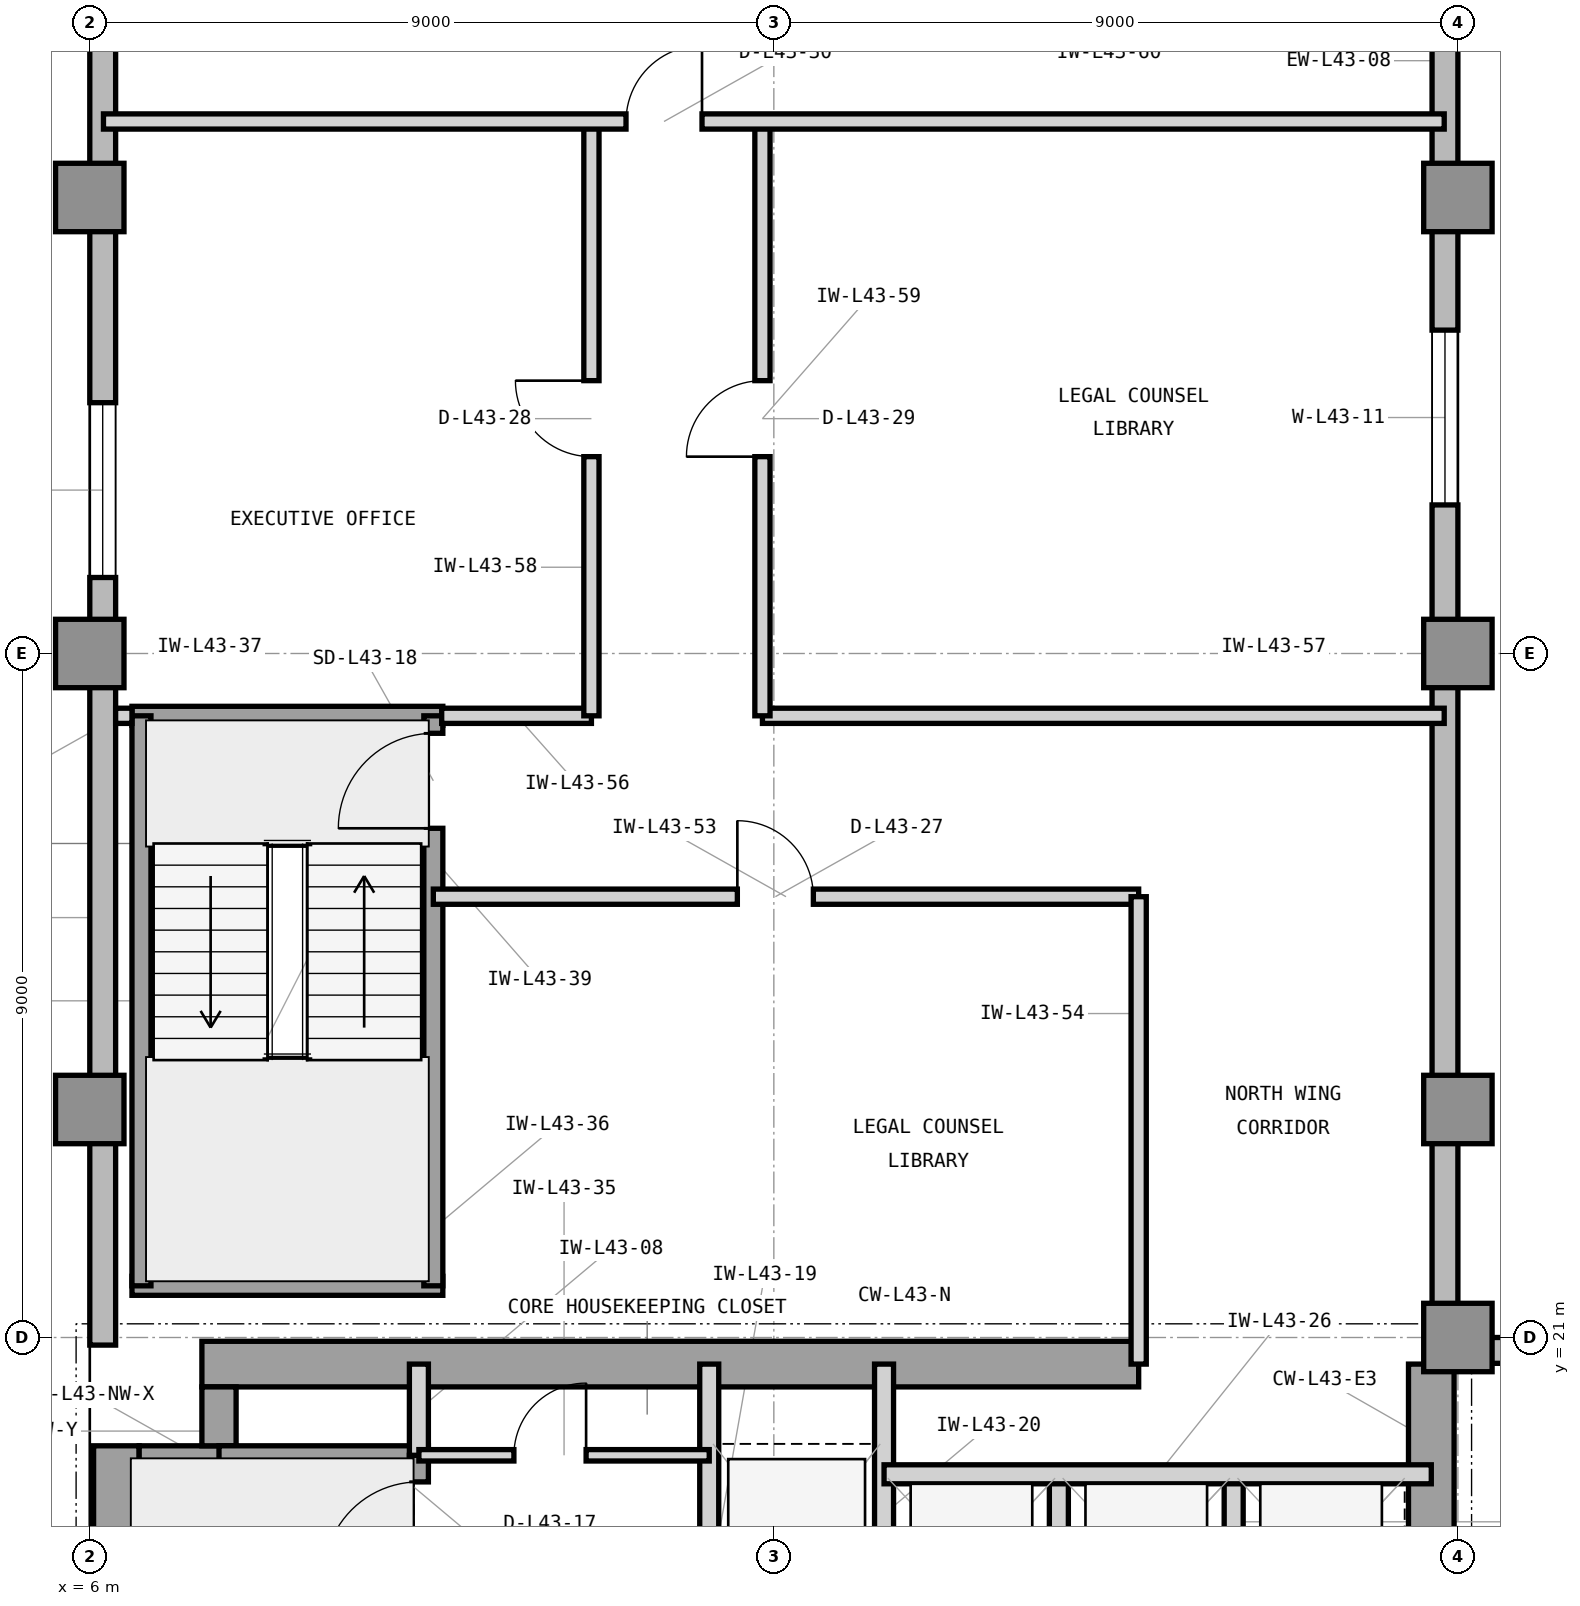
"""IFC4 building model, lengths in metres.
Left out: names, types, materials, properties, quantities, classifications, styles, units other than length and angle.
Written with IfcOpenShell. Run it as: python <this file> out.ifc"""

import sys

from ifc_helpers import new_model, si_unit, direction, frame, frame_2d, origin, origin_2d, place, context, subcontext, project, spatial, rectangle, extrude, element, fill, save


model = new_model("IFC4")
c1 = context("Model", 3, precision=1e-05, world=origin(), true_north=direction((0.0, 1.0)))
c2 = subcontext(c1, "Body", "Model", "MODEL_VIEW")
j1 = project(units=[si_unit("LENGTHUNIT", "METRE"), si_unit("PLANEANGLEUNIT", "RADIAN")], contexts=[c1])
p1 = place(None, origin())
s1 = spatial("IfcSite", under=j1, at=p1, CompositionType="ELEMENT")
p2 = place(p1, origin())
s2 = spatial("IfcBuilding", under=s1, at=p2, CompositionType="ELEMENT")
p3 = place(p2, frame((0.0, 0.0, 180.0)))
s3 = spatial("IfcBuildingStorey", under=s2, at=p3, CompositionType="ELEMENT", Elevation=180.0)
p4 = place(p3, frame((6.35, 4.425, 0.0), z_axis=(0.0, 0.0, 1.0), x_axis=(0.0, 1.0, 0.0)))
e1 = element("IfcWall", 1, at=p4, inside=s3, PredefinedType="SHEAR", context=c2, shape_type="SweptSolid", body=[
    extrude(rectangle(XDim=15.15, YDim=0.6, at=frame_2d((7.575, 0.0))), origin(), (0.0, 0.0, 1.0), 3.9),
])
p5 = place(p3, frame((7.475, 20.65, 0.0), z_axis=(0.0, 0.0, 1.0), x_axis=(1.0, 0.0, 0.0)))
e2 = element("IfcWall", 2, at=p5, inside=s3, PredefinedType="SHEAR", context=c2, shape_type="SweptSolid", body=[
    extrude(rectangle(XDim=12.325, YDim=0.6, at=frame_2d((6.163, 0.0))), origin(), (0.0, 0.0, 1.0), 3.9),
])
p6 = place(p3, frame((23.65, 16.6, 0.0), z_axis=(0.0, 0.0, 1.0), x_axis=(0.0, 1.0, 0.0)))
e3 = element("IfcWall", 3, at=p6, inside=s3, PredefinedType="SHEAR", context=c2, shape_type="SweptSolid", body=[
    extrude(rectangle(XDim=4.05, YDim=0.6, at=frame_2d((2.025, 0.0))), origin(), (0.0, 0.0, 1.0), 3.9),
])
p7 = place(p3, frame((6.65, 19.35, 0.0), z_axis=(0.0, 0.0, 1.0), x_axis=(1.0, 0.0, 0.0)))
e4 = element("IfcWall", 4, at=p7, inside=s3, PredefinedType="SHEAR", context=c2, shape_type="SweptSolid", body=[
    extrude(rectangle(XDim=1.275, YDim=0.45, at=frame_2d((0.638, 0.0))), origin(), (0.0, 0.0, 1.0), 3.9),
])
p8 = place(p3, frame((7.7, 19.575, 0.0), z_axis=(0.0, 0.0, 1.0), x_axis=(0.0, 1.0, 0.0)))
e5 = element("IfcWall", 5, at=p8, inside=s3, PredefinedType="SHEAR", context=c2, shape_type="SweptSolid", body=[
    extrude(rectangle(XDim=0.775, YDim=0.45, at=frame_2d((0.388, 0.0))), origin(), (0.0, 0.0, 1.0), 3.9),
])
for number, where, z_axis, x_axis in (
    (6, (24.0, 21.0, 0.0), (0.0, 0.0, 1.0), (1.0, 0.0, 0.0)),
    (7, (6.0, 24.0, 0.0), (0.0, 0.0, 1.0), (1.0, 0.0, 0.0)),
    (8, (24.0, 24.0, 0.0), (0.0, 0.0, 1.0), (1.0, 0.0, 0.0)),
    (9, (6.0, 30.0, 0.0), (0.0, 0.0, 1.0), (1.0, 0.0, 0.0)),
    (10, (24.0, 30.0, 0.0), (0.0, 0.0, 1.0), (1.0, 0.0, 0.0)),
    (11, (6.0, 36.0, 0.0), (0.0, 0.0, 1.0), (1.0, 0.0, 0.0)),
    (12, (24.0, 36.0, 0.0), (0.0, 0.0, 1.0), (1.0, 0.0, 0.0)),
):
    element("IfcColumn", number, at=place(p3, frame(where, z_axis=z_axis, x_axis=x_axis)), inside=s3, PredefinedType="COLUMN", context=c2, shape_type="SweptSolid", body=[
        extrude(rectangle(XDim=0.9, YDim=0.9, at=origin_2d()), origin(), (0.0, 0.0, 1.0), 3.9),
    ])
p9 = place(p3, frame((55.4, 20.83, 0.0), z_axis=(0.0, 0.0, 1.0), x_axis=(-1.0, 0.0, 0.0)))
e13 = element("IfcWall", 13, at=p9, inside=s3, PredefinedType="STANDARD", context=c2, shape_type="SweptSolid", body=[
    extrude(rectangle(XDim=31.4, YDim=0.34, at=frame_2d((15.7, 0.0))), origin(), (0.0, 0.0, 1.0), 3.7),
])
p10 = place(p9, frame((29.046, 0.0, 0.9)))
e14 = element("IfcOpeningElement", 14, at=p10, cuts=e13, PredefinedType="OPENING", context=c2, shape_type="SweptSolid", body=[
    extrude(rectangle(XDim=1.6, YDim=2.2, at=frame_2d((0.8, 1.1))), frame((0.0, 0.18, 0.0), z_axis=(0.0, -1.0, 0.0), x_axis=(1.0, 0.0, 0.0)), (0.0, 0.0, 1.0), 0.36),
])
p11 = place(p9, frame((10.125, 0.0, 0.9)))
e15 = element("IfcOpeningElement", 15, at=p11, cuts=e13, PredefinedType="OPENING", context=c2, shape_type="SweptSolid", body=[
    extrude(rectangle(XDim=2.3, YDim=2.2, at=frame_2d((1.15, 1.1))), frame((0.0, 0.18, 0.0), z_axis=(0.0, -1.0, 0.0), x_axis=(1.0, 0.0, 0.0)), (0.0, 0.0, 1.0), 0.36),
])
p12 = place(p3, frame((23.83, 21.0, 0.0), z_axis=(0.0, 0.0, 1.0), x_axis=(0.0, 1.0, 0.0)))
e16 = element("IfcWall", 16, at=p12, inside=s3, PredefinedType="STANDARD", context=c2, shape_type="SweptSolid", body=[
    extrude(rectangle(XDim=22.4, YDim=0.34, at=frame_2d((11.2, 0.0))), origin(), (0.0, 0.0, 1.0), 3.7),
])
p13 = place(p12, frame((10.955, 0.0, 0.9)))
e17 = element("IfcOpeningElement", 17, at=p13, cuts=e16, PredefinedType="OPENING", context=c2, shape_type="SweptSolid", body=[
    extrude(rectangle(XDim=2.3, YDim=2.2, at=frame_2d((1.15, 1.1))), frame((0.0, 0.18, 0.0), z_axis=(0.0, -1.0, 0.0), x_axis=(1.0, 0.0, 0.0)), (0.0, 0.0, 1.0), 0.36),
])
p14 = place(p3, frame((6.17, 43.4, 0.0), z_axis=(0.0, 0.0, 1.0), x_axis=(0.0, -1.0, 0.0)))
e18 = element("IfcWall", 18, at=p14, inside=s3, PredefinedType="STANDARD", context=c2, shape_type="SweptSolid", body=[
    extrude(rectangle(XDim=22.5, YDim=0.34, at=frame_2d((11.25, 0.0))), origin(), (0.0, 0.0, 1.0), 3.7),
])
p15 = place(p14, frame((10.1, 0.0, 0.9)))
e19 = element("IfcOpeningElement", 19, at=p15, cuts=e18, PredefinedType="OPENING", context=c2, shape_type="SweptSolid", body=[
    extrude(rectangle(XDim=2.3, YDim=2.2, at=frame_2d((1.15, 1.1))), frame((0.0, 0.18, 0.0), z_axis=(0.0, -1.0, 0.0), x_axis=(1.0, 0.0, 0.0)), (0.0, 0.0, 1.0), 0.36),
])
p16 = place(p3, frame((7.7, 19.45, 0.0), z_axis=(0.0, 0.0, 1.0), x_axis=(1.0, 0.0, 0.0)))
e20 = element("IfcWall", 20, at=p16, inside=s3, PredefinedType="SHEAR", context=c2, shape_type="SweptSolid", body=[
    extrude(rectangle(XDim=2.755, YDim=0.25, at=frame_2d((1.377, 0.0))), origin(), (0.0, 0.0, 1.0), 3.9),
])
p17 = place(p3, frame((10.33, 12.0, 0.0), z_axis=(0.0, 0.0, 1.0), x_axis=(0.0, 1.0, 0.0)))
e21 = element("IfcWall", 21, at=p17, inside=s3, PredefinedType="SHEAR", context=c2, shape_type="SweptSolid", body=[
    extrude(rectangle(XDim=7.45, YDim=0.25, at=frame_2d((3.725, 0.0))), origin(), (0.0, 0.0, 1.0), 3.9),
])
p18 = place(p17, frame((5.85, 0.0, 0.0)))
e22 = element("IfcOpeningElement", 22, at=p18, cuts=e21, PredefinedType="OPENING", context=c2, shape_type="SweptSolid", body=[
    extrude(rectangle(XDim=1.25, YDim=2.2, at=frame_2d((0.625, 1.1))), frame((0.0, 0.135, 0.0), z_axis=(0.0, -1.0, 0.0), x_axis=(1.0, 0.0, 0.0)), (0.0, 0.0, 1.0), 0.27),
])
p19 = place(p3, frame((10.33, 19.45, 0.0), z_axis=(0.0, 0.0, 1.0), x_axis=(0.0, 1.0, 0.0)))
e23 = element("IfcWall", 23, at=p19, inside=s3, PredefinedType="PARTITIONING", context=c2, shape_type="SweptSolid", body=[
    extrude(rectangle(XDim=1.2, YDim=0.25, at=frame_2d((0.6, 0.0))), origin(), (0.0, 0.0, 1.0), 3.073),
])
for number, where, z_axis, x_axis in (
    (24, (14.15, 16.7, 0.0), (0.0, 0.0, 1.0), (0.0, 1.0, 0.0)),
    (25, (16.45, 16.7, 0.0), (0.0, 0.0, 1.0), (0.0, 1.0, 0.0)),
):
    element("IfcWall", number, at=place(p3, frame(where, z_axis=z_axis, x_axis=x_axis)), inside=s3, PredefinedType="PARTITIONING", context=c2, shape_type="SweptSolid", body=[
        extrude(rectangle(XDim=3.95, YDim=0.25, at=frame_2d((1.975, 0.0))), origin(), (0.0, 0.0, 1.0), 3.69),
    ])
for number, where, z_axis, x_axis in (
    (26, (18.75, 16.7, 0.0), (0.0, 0.0, 1.0), (0.0, 1.0, 0.0)),
    (27, (21.05, 16.7, 0.0), (0.0, 0.0, 1.0), (0.0, 1.0, 0.0)),
):
    element("IfcWall", number, at=place(p3, frame(where, z_axis=z_axis, x_axis=x_axis)), inside=s3, PredefinedType="PARTITIONING", context=c2, shape_type="SweptSolid", body=[
        extrude(rectangle(XDim=2.5, YDim=0.25, at=frame_2d((1.25, 0.0))), origin(), (0.0, 0.0, 1.0), 3.69),
    ])
p20 = place(p3, frame((16.45, 19.2, 0.0), z_axis=(0.0, 0.0, 1.0), x_axis=(1.0, 0.0, 0.0)))
e28 = element("IfcWall", 28, at=p20, inside=s3, PredefinedType="PARTITIONING", context=c2, shape_type="SweptSolid", body=[
    extrude(rectangle(XDim=7.2, YDim=0.25, at=frame_2d((3.6, 0.0))), origin(), (0.0, 0.0, 1.0), 3.69),
])
p21 = place(p3, frame((10.33, 19.45, 0.0), z_axis=(0.0, 0.0, 1.0), x_axis=(1.0, 0.0, 0.0)))
e29 = element("IfcWall", 29, at=p21, inside=s3, PredefinedType="PARTITIONING", context=c2, shape_type="SweptSolid", body=[
    extrude(rectangle(XDim=3.82, YDim=0.15, at=frame_2d((1.91, 0.0))), origin(), (0.0, 0.0, 1.0), 3.69),
])
p22 = place(p21, frame((1.25, 0.0, 0.0)))
e30 = element("IfcOpeningElement", 30, at=p22, cuts=e29, PredefinedType="OPENING", context=c2, shape_type="SweptSolid", body=[
    extrude(rectangle(XDim=0.95, YDim=2.1, at=frame_2d((0.475, 1.05))), frame((0.0, 0.085, 0.0), z_axis=(0.0, -1.0, 0.0), x_axis=(1.0, 0.0, 0.0)), (0.0, 0.0, 1.0), 0.17),
])
for number, where, z_axis, x_axis in (
    (31, (6.555, 21.68, 0.0), (0.0, 0.0, 1.0), (1.0, 0.0, 0.0)),
    (32, (6.555, 29.18, 0.0), (0.0, 0.0, 1.0), (1.0, 0.0, 0.0)),
):
    element("IfcWall", number, at=place(p3, frame(where, z_axis=z_axis, x_axis=x_axis)), inside=s3, PredefinedType="SHEAR", context=c2, shape_type="SweptSolid", body=[
        extrude(rectangle(XDim=4.09, YDim=0.25, at=frame_2d((2.045, 0.0))), origin(), (0.0, 0.0, 1.0), 3.9),
    ])
p23 = place(p3, frame((6.68, 21.68, 0.0), z_axis=(0.0, 0.0, 1.0), x_axis=(0.0, 1.0, 0.0)))
e33 = element("IfcWall", 33, at=p23, inside=s3, PredefinedType="SHEAR", context=c2, shape_type="SweptSolid", body=[
    extrude(rectangle(XDim=7.5, YDim=0.25, at=frame_2d((3.75, 0.0))), origin(), (0.0, 0.0, 1.0), 3.9),
])
p24 = place(p3, frame((10.52, 21.68, 0.0), z_axis=(0.0, 0.0, 1.0), x_axis=(0.0, 1.0, 0.0)))
e34 = element("IfcWall", 34, at=p24, inside=s3, PredefinedType="SHEAR", context=c2, shape_type="SweptSolid", body=[
    extrude(rectangle(XDim=7.5, YDim=0.25, at=frame_2d((3.75, 0.0))), origin(), (0.0, 0.0, 1.0), 3.9),
])
p25 = place(p24, frame((6.02, 0.0, 0.0)))
e35 = element("IfcOpeningElement", 35, at=p25, cuts=e34, PredefinedType="OPENING", context=c2, shape_type="SweptSolid", body=[
    extrude(rectangle(XDim=1.25, YDim=2.2, at=frame_2d((0.625, 1.1))), frame((0.0, 0.135, 0.0), z_axis=(0.0, -1.0, 0.0), x_axis=(1.0, 0.0, 0.0)), (0.0, 0.0, 1.0), 0.27),
])
p26 = place(p3, frame((10.52, 26.8, 0.0), z_axis=(0.0, 0.0, 1.0), x_axis=(1.0, 0.0, 0.0)))
e36 = element("IfcWall", 36, at=p26, inside=s3, PredefinedType="PARTITIONING", context=c2, shape_type="SweptSolid", body=[
    extrude(rectangle(XDim=9.28, YDim=0.2, at=frame_2d((4.64, 0.0))), origin(), (0.0, 0.0, 1.0), 3.69),
])
p27 = place(p26, frame((4.0, 0.0, 0.0)))
e37 = element("IfcOpeningElement", 37, at=p27, cuts=e36, PredefinedType="OPENING", context=c2, shape_type="SweptSolid", body=[
    extrude(rectangle(XDim=1.0, YDim=2.15, at=frame_2d((0.5, 1.075))), frame((0.0, 0.11, 0.0), z_axis=(0.0, -1.0, 0.0), x_axis=(1.0, 0.0, 0.0)), (0.0, 0.0, 1.0), 0.22),
])
p28 = place(p3, frame((19.8, 20.65, 0.0), z_axis=(0.0, 0.0, 1.0), x_axis=(0.0, 1.0, 0.0)))
e38 = element("IfcWall", 38, at=p28, inside=s3, PredefinedType="PARTITIONING", context=c2, shape_type="SweptSolid", body=[
    extrude(rectangle(XDim=6.15, YDim=0.2, at=frame_2d((3.075, 0.0))), origin(), (0.0, 0.0, 1.0), 3.69),
])
p29 = place(p3, frame((6.34, 29.18, 0.0), z_axis=(0.0, 0.0, 1.0), x_axis=(1.0, 0.0, 0.0)))
e39 = element("IfcWall", 39, at=p29, inside=s3, PredefinedType="PARTITIONING", context=c2, shape_type="SweptSolid", body=[
    extrude(rectangle(XDim=0.215, YDim=0.2, at=frame_2d((0.107, 0.0))), origin(), (0.0, 0.0, 1.0), 3.69),
])
p30 = place(p3, frame((10.63, 29.18, 0.0), z_axis=(0.0, 0.0, 1.0), x_axis=(1.0, 0.0, 0.0)))
e40 = element("IfcWall", 40, at=p30, inside=s3, PredefinedType="PARTITIONING", context=c2, shape_type="SweptSolid", body=[
    extrude(rectangle(XDim=1.97, YDim=0.2, at=frame_2d((0.985, 0.0))), origin(), (0.0, 0.0, 1.0), 3.69),
])
p31 = place(p3, frame((14.85, 29.18, 0.0), z_axis=(0.0, 0.0, 1.0), x_axis=(1.0, 0.0, 0.0)))
e41 = element("IfcWall", 41, at=p31, inside=s3, PredefinedType="PARTITIONING", context=c2, shape_type="SweptSolid", body=[
    extrude(rectangle(XDim=8.97, YDim=0.2, at=frame_2d((4.485, 0.0))), origin(), (0.0, 0.0, 1.0), 3.69),
])
p32 = place(p3, frame((12.6, 29.18, 0.0), z_axis=(0.0, 0.0, 1.0), x_axis=(0.0, 1.0, 0.0)))
e42 = element("IfcWall", 42, at=p32, inside=s3, PredefinedType="PARTITIONING", context=c2, shape_type="SweptSolid", body=[
    extrude(rectangle(XDim=7.82, YDim=0.2, at=frame_2d((3.91, 0.0))), origin(), (0.0, 0.0, 1.0), 3.69),
])
p33 = place(p32, frame((3.41, 0.0, 0.0)))
e43 = element("IfcOpeningElement", 43, at=p33, cuts=e42, PredefinedType="OPENING", context=c2, shape_type="SweptSolid", body=[
    extrude(rectangle(XDim=1.0, YDim=2.15, at=frame_2d((0.5, 1.075))), frame((0.0, 0.11, 0.0), z_axis=(0.0, -1.0, 0.0), x_axis=(1.0, 0.0, 0.0)), (0.0, 0.0, 1.0), 0.22),
])
p34 = place(p3, frame((14.85, 29.18, 0.0), z_axis=(0.0, 0.0, 1.0), x_axis=(0.0, 1.0, 0.0)))
e44 = element("IfcWall", 44, at=p34, inside=s3, PredefinedType="PARTITIONING", context=c2, shape_type="SweptSolid", body=[
    extrude(rectangle(XDim=7.82, YDim=0.2, at=frame_2d((3.91, 0.0))), origin(), (0.0, 0.0, 1.0), 3.69),
])
p35 = place(p34, frame((3.41, 0.0, 0.0)))
e45 = element("IfcOpeningElement", 45, at=p35, cuts=e44, PredefinedType="OPENING", context=c2, shape_type="SweptSolid", body=[
    extrude(rectangle(XDim=1.0, YDim=2.15, at=frame_2d((0.5, 1.075))), frame((0.0, 0.11, 0.0), z_axis=(0.0, -1.0, 0.0), x_axis=(1.0, 0.0, 0.0)), (0.0, 0.0, 1.0), 0.22),
])
p36 = place(p3, frame((6.18, 37.0, 0.0), z_axis=(0.0, 0.0, 1.0), x_axis=(1.0, 0.0, 0.0)))
e46 = element("IfcWall", 46, at=p36, inside=s3, PredefinedType="PARTITIONING", context=c2, shape_type="SweptSolid", body=[
    extrude(rectangle(XDim=17.64, YDim=0.2, at=frame_2d((8.82, 0.0))), origin(), (0.0, 0.0, 1.0), 3.69),
])
p37 = place(p36, frame((6.875, 0.0, 0.0)))
e47 = element("IfcOpeningElement", 47, at=p37, cuts=e46, PredefinedType="OPENING", context=c2, shape_type="SweptSolid", body=[
    extrude(rectangle(XDim=1.0, YDim=2.15, at=frame_2d((0.5, 1.075))), frame((0.0, 0.11, 0.0), z_axis=(0.0, -1.0, 0.0), x_axis=(1.0, 0.0, 0.0)), (0.0, 0.0, 1.0), 0.22),
])
p38 = place(p15, origin())
e48 = element("IfcWindow", 48, at=p38, inside=s3, PartitioningType="SINGLE_PANEL", PredefinedType="WINDOW", context=c2, shape_type="SweptSolid", body=[
    extrude(rectangle(XDim=2.3, YDim=2.2, at=frame_2d((1.15, 1.1))), frame((0.0, 0.11, 0.0), z_axis=(0.0, -1.0, 0.0), x_axis=(1.0, 0.0, 0.0)), (0.0, 0.0, 1.0), 0.06),
])
fill(e19, e48)
p39 = place(p18, origin())
e49 = element("IfcDoor", 49, at=p39, inside=s3, OperationType="SINGLE_SWING_LEFT", PredefinedType="DOOR", context=c2, shape_type="SweptSolid", body=[
    extrude(rectangle(XDim=1.25, YDim=2.2, at=frame_2d((0.625, 1.1))), frame((0.0, 0.025, 0.0), z_axis=(0.0, -1.0, 0.0), x_axis=(1.0, 0.0, 0.0)), (0.0, 0.0, 1.0), 0.05),
])
fill(e22, e49)
p40 = place(p22, origin())
e50 = element("IfcDoor", 50, at=p40, inside=s3, OperationType="SINGLE_SWING_RIGHT", PredefinedType="DOOR", context=c2, shape_type="SweptSolid", body=[
    extrude(rectangle(XDim=0.95, YDim=2.1, at=frame_2d((0.475, 1.05))), frame((0.0, 0.025, 0.0), z_axis=(0.0, -1.0, 0.0), x_axis=(1.0, 0.0, 0.0)), (0.0, 0.0, 1.0), 0.05),
])
fill(e30, e50)
p41 = place(p25, origin())
e51 = element("IfcDoor", 51, at=p41, inside=s3, OperationType="SINGLE_SWING_LEFT", PredefinedType="DOOR", context=c2, shape_type="SweptSolid", body=[
    extrude(rectangle(XDim=1.25, YDim=2.2, at=frame_2d((0.625, 1.1))), frame((0.0, 0.025, 0.0), z_axis=(0.0, -1.0, 0.0), x_axis=(1.0, 0.0, 0.0)), (0.0, 0.0, 1.0), 0.05),
])
fill(e35, e51)
p42 = place(p27, origin())
e52 = element("IfcDoor", 52, at=p42, inside=s3, OperationType="SINGLE_SWING_LEFT", PredefinedType="DOOR", context=c2, shape_type="SweptSolid", body=[
    extrude(rectangle(XDim=1.0, YDim=2.15, at=frame_2d((0.5, 1.075))), frame((0.0, 0.025, 0.0), z_axis=(0.0, -1.0, 0.0), x_axis=(1.0, 0.0, 0.0)), (0.0, 0.0, 1.0), 0.05),
])
fill(e37, e52)
p43 = place(p33, origin())
e53 = element("IfcDoor", 53, at=p43, inside=s3, OperationType="SINGLE_SWING_RIGHT", PredefinedType="DOOR", context=c2, shape_type="SweptSolid", body=[
    extrude(rectangle(XDim=1.0, YDim=2.15, at=frame_2d((0.5, 1.075))), frame((0.0, 0.025, 0.0), z_axis=(0.0, -1.0, 0.0), x_axis=(1.0, 0.0, 0.0)), (0.0, 0.0, 1.0), 0.05),
])
fill(e43, e53)
p44 = place(p35, origin())
e54 = element("IfcDoor", 54, at=p44, inside=s3, OperationType="SINGLE_SWING_LEFT", PredefinedType="DOOR", context=c2, shape_type="SweptSolid", body=[
    extrude(rectangle(XDim=1.0, YDim=2.15, at=frame_2d((0.5, 1.075))), frame((0.0, 0.025, 0.0), z_axis=(0.0, -1.0, 0.0), x_axis=(1.0, 0.0, 0.0)), (0.0, 0.0, 1.0), 0.05),
])
fill(e45, e54)
p45 = place(p37, origin())
e55 = element("IfcDoor", 55, at=p45, inside=s3, OperationType="SINGLE_SWING_RIGHT", PredefinedType="DOOR", context=c2, shape_type="SweptSolid", body=[
    extrude(rectangle(XDim=1.0, YDim=2.15, at=frame_2d((0.5, 1.075))), frame((0.0, 0.025, 0.0), z_axis=(0.0, -1.0, 0.0), x_axis=(1.0, 0.0, 0.0)), (0.0, 0.0, 1.0), 0.05),
])
fill(e47, e55)
p46 = place(p13, origin())
e56 = element("IfcWindow", 56, at=p46, inside=s3, PartitioningType="SINGLE_PANEL", PredefinedType="WINDOW", context=c2, shape_type="SweptSolid", body=[
    extrude(rectangle(XDim=2.3, YDim=2.2, at=frame_2d((1.15, 1.1))), frame((0.0, 0.11, 0.0), z_axis=(0.0, -1.0, 0.0), x_axis=(1.0, 0.0, 0.0)), (0.0, 0.0, 1.0), 0.06),
])
fill(e17, e56)
save(model, sys.argv[1])
